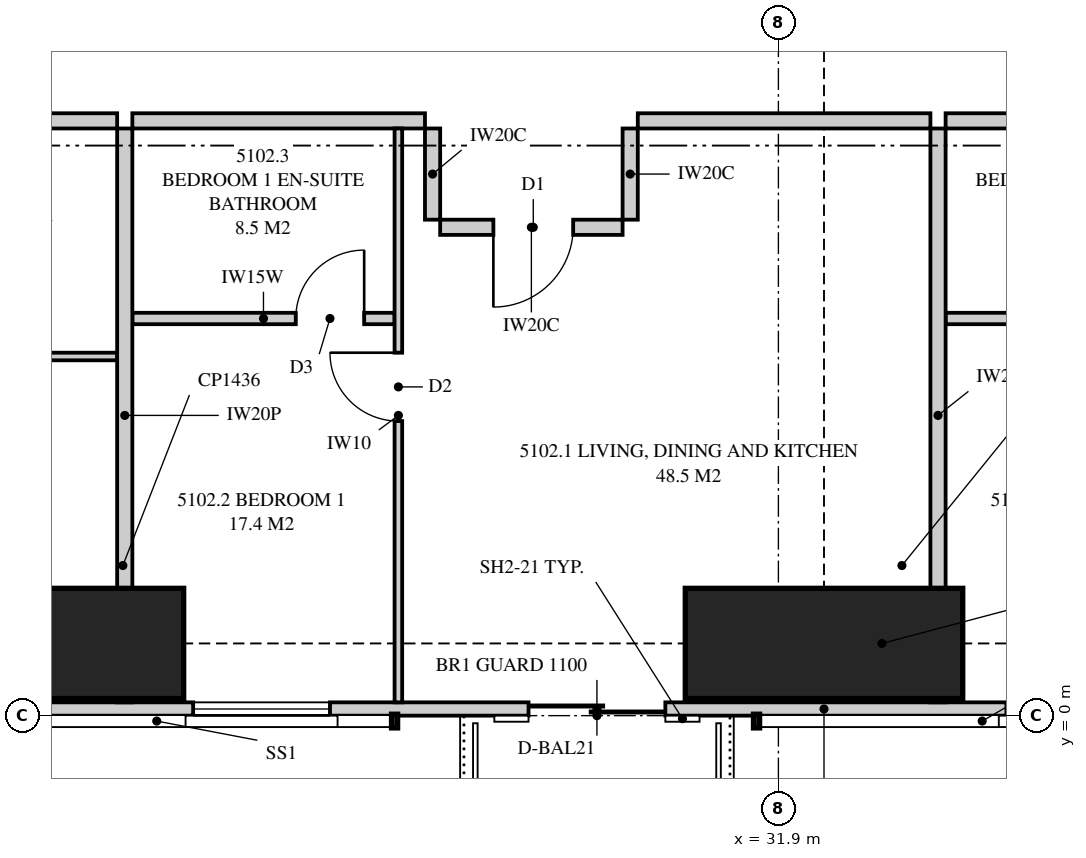
"""IFC4 building model, lengths in metres.
Left out: names, types, materials, properties, quantities, classifications, styles, units other than length and angle.
Written with IfcOpenShell. Run it as: python <this file> out.ifc"""

import sys

from ifc_helpers import new_model, si_unit, direction, frame, frame_2d, origin, origin_2d, place, context, subcontext, project, spatial, polyline, rectangle, outline, extrude, element, fill, save


model = new_model("IFC4")
c1 = context("Model", 3, precision=1e-05, world=origin(), true_north=direction((0.0, 1.0)))
c2 = subcontext(c1, "Body", "Model", "MODEL_VIEW")
j1 = project(units=[si_unit("LENGTHUNIT", "METRE"), si_unit("PLANEANGLEUNIT", "RADIAN")], contexts=[c1])
p1 = place(None, origin())
s1 = spatial("IfcSite", under=j1, at=p1, CompositionType="ELEMENT")
p2 = place(p1, origin())
s2 = spatial("IfcBuilding", under=s1, at=p2, CompositionType="ELEMENT")
p3 = place(p2, frame((0.0, 0.0, 187.85)))
s3 = spatial("IfcBuildingStorey", under=s2, at=p3, CompositionType="ELEMENT", Elevation=187.85)
for number, where, z_axis, x_axis in (
    (1, (22.25, 0.95, 0.0), (0.0, 0.0, 1.0), (0.0, 1.0, 0.0)),
    (2, (32.5, 0.95, 0.0), (0.0, 0.0, 1.0), (0.0, 1.0, 0.0)),
):
    element("IfcColumn", number, at=place(p3, frame(where, z_axis=z_axis, x_axis=x_axis)), inside=s3, PredefinedType="COLUMN", context=c2, shape_type="SweptSolid", body=[
        extrude(rectangle(XDim=1.45, YDim=3.65, at=origin_2d()), origin(), (0.0, 0.0, 1.0), 3.35),
    ])
p4 = place(p3, frame((15.051, 0.087, 0.0), z_axis=(0.0, 0.0, 1.0), x_axis=(1.0, 0.0, 0.0)))
e3 = element("IfcWall", 3, at=p4, inside=s3, PredefinedType="SOLIDWALL", context=c2, shape_type="SweptSolid", body=[
    extrude(outline(polyline([(0.0, 0.0), (34.897, 0.0), (34.897, 3.11), (27.91, 3.11), (27.91, 2.15), (27.836, 2.15), (27.836, 3.11), (27.699, 3.11), (27.699, 2.15), (7.199, 2.15), (7.199, 3.11), (7.062, 3.11), (7.062, 2.15), (6.987, 2.15), (6.987, 3.11), (0.0, 3.11), (0.0, 0.0)])), frame((0.0, 0.087, 0.0), z_axis=(0.0, -1.0, 0.0), x_axis=(1.0, 0.0, 0.0)), (0.0, 0.0, 1.0), 0.175),
])
p5 = place(p4, frame((2.84, 0.0, 0.4)))
e4 = element("IfcOpeningElement", 4, at=p5, cuts=e3, PredefinedType="OPENING", context=c2, shape_type="SweptSolid", body=[
    extrude(rectangle(XDim=2.4, YDim=1.7, at=frame_2d((1.2, 0.85))), frame((0.0, 0.097, 0.0), z_axis=(0.0, -1.0, 0.0), x_axis=(1.0, 0.0, 0.0)), (0.0, 0.0, 1.0), 0.195),
])
p6 = place(p4, frame((9.149, 0.0, 0.4)))
e5 = element("IfcOpeningElement", 5, at=p6, cuts=e3, PredefinedType="OPENING", context=c2, shape_type="SweptSolid", body=[
    extrude(rectangle(XDim=1.8, YDim=1.7, at=frame_2d((0.9, 0.85))), frame((0.0, 0.097, 0.0), z_axis=(0.0, -1.0, 0.0), x_axis=(1.0, 0.0, 0.0)), (0.0, 0.0, 1.0), 0.195),
])
p7 = place(p4, frame((13.561, 0.0, 0.0)))
e6 = element("IfcOpeningElement", 6, at=p7, cuts=e3, PredefinedType="OPENING", context=c2, shape_type="SweptSolid", body=[
    extrude(rectangle(XDim=1.8, YDim=2.1, at=frame_2d((0.9, 1.05))), frame((0.0, 0.097, 0.0), z_axis=(0.0, -1.0, 0.0), x_axis=(1.0, 0.0, 0.0)), (0.0, 0.0, 1.0), 0.195),
])
p8 = place(p4, frame((19.849, 0.0, 0.4)))
e7 = element("IfcOpeningElement", 7, at=p8, cuts=e3, PredefinedType="OPENING", context=c2, shape_type="SweptSolid", body=[
    extrude(rectangle(XDim=1.8, YDim=1.7, at=frame_2d((0.9, 0.85))), frame((0.0, 0.097, 0.0), z_axis=(0.0, -1.0, 0.0), x_axis=(1.0, 0.0, 0.0)), (0.0, 0.0, 1.0), 0.195),
])
p9 = place(p4, frame((23.449, 0.0, 0.4)))
e8 = element("IfcOpeningElement", 8, at=p9, cuts=e3, PredefinedType="OPENING", context=c2, shape_type="SweptSolid", body=[
    extrude(rectangle(XDim=1.8, YDim=1.7, at=frame_2d((0.9, 0.85))), frame((0.0, 0.097, 0.0), z_axis=(0.0, -1.0, 0.0), x_axis=(1.0, 0.0, 0.0)), (0.0, 0.0, 1.0), 0.195),
])
p10 = place(p4, frame((29.636, 0.0, 0.4)))
e9 = element("IfcOpeningElement", 9, at=p10, cuts=e3, PredefinedType="OPENING", context=c2, shape_type="SweptSolid", body=[
    extrude(rectangle(XDim=1.8, YDim=1.7, at=frame_2d((0.9, 0.85))), frame((0.0, 0.097, 0.0), z_axis=(0.0, -1.0, 0.0), x_axis=(1.0, 0.0, 0.0)), (0.0, 0.0, 1.0), 0.195),
])
p11 = place(p4, frame((32.56, 0.0, 0.4)))
e10 = element("IfcOpeningElement", 10, at=p11, cuts=e3, PredefinedType="OPENING", context=c2, shape_type="SweptSolid", body=[
    extrude(rectangle(XDim=1.8, YDim=1.7, at=frame_2d((0.9, 0.85))), frame((0.0, 0.097, 0.0), z_axis=(0.0, -1.0, 0.0), x_axis=(1.0, 0.0, 0.0)), (0.0, 0.0, 1.0), 0.195),
])
p12 = place(p3, frame((23.3, 0.175, 0.0), z_axis=(0.0, 0.0, 1.0), x_axis=(0.0, 1.0, 0.0)))
e11 = element("IfcWall", 11, at=p12, inside=s3, PredefinedType="PARTITIONING", context=c2, shape_type="SweptSolid", body=[
    extrude(outline(polyline([(0.529, 2.15), (0.0, 2.15), (0.0, 0.0), (0.529, 0.0), (0.529, 0.472), (1.021, 0.472), (1.021, 0.0), (7.55, 0.0), (7.55, 3.11), (1.685, 3.11), (1.685, 2.15), (1.021, 2.15), (1.021, 1.678), (0.529, 1.678), (0.529, 2.15)])), frame((0.0, 0.1, 0.0), z_axis=(0.0, -1.0, 0.0), x_axis=(1.0, 0.0, 0.0)), (0.0, 0.0, 1.0), 0.2),
])
p13 = place(p3, frame((17.85, 7.825, 0.0), z_axis=(0.0, 0.0, 1.0), x_axis=(1.0, 0.0, 0.0)))
e12 = element("IfcWall", 12, at=p13, inside=s3, PredefinedType="PARTITIONING", context=c2, shape_type="SweptSolid", body=[
    extrude(outline(polyline([(0.0, 0.0), (5.35, 0.0), (5.35, 3.11), (4.737, 3.11), (4.737, 2.541), (4.062, 2.541), (4.062, 3.11), (0.0, 3.11), (0.0, 0.0)])), frame((0.0, 0.1, 0.0), z_axis=(0.0, -1.0, 0.0), x_axis=(1.0, 0.0, 0.0)), (0.0, 0.0, 1.0), 0.2),
])
p14 = place(p13, frame((0.2, 0.0, 0.0)))
e13 = element("IfcOpeningElement", 13, at=p14, cuts=e12, PredefinedType="OPENING", context=c2, shape_type="SweptSolid", body=[
    extrude(rectangle(XDim=1.05, YDim=2.2, at=frame_2d((0.525, 1.1))), frame((0.0, 0.11, 0.0), z_axis=(0.0, -1.0, 0.0), x_axis=(1.0, 0.0, 0.0)), (0.0, 0.0, 1.0), 0.22),
])
p15 = place(p3, frame((19.65, 4.725, 0.0), z_axis=(0.0, 0.0, 1.0), x_axis=(1.0, 0.0, 0.0)))
e14 = element("IfcWall", 14, at=p15, inside=s3, PredefinedType="PARTITIONING", context=c2, shape_type="SweptSolid", body=[
    extrude(outline(polyline([(0.0, 0.0), (3.55, 0.0), (3.55, 3.11), (2.887, 3.11), (2.887, 2.541), (2.312, 2.541), (2.312, 3.11), (0.0, 3.11), (0.0, 0.0)])), frame((0.0, 0.05, 0.0), z_axis=(0.0, -1.0, 0.0), x_axis=(1.0, 0.0, 0.0)), (0.0, 0.0, 1.0), 0.1),
])
p16 = place(p15, frame((1.3, 0.0, 0.0)))
e15 = element("IfcOpeningElement", 15, at=p16, cuts=e14, PredefinedType="OPENING", context=c2, shape_type="SweptSolid", body=[
    extrude(rectangle(XDim=0.9, YDim=2.1, at=frame_2d((0.45, 1.05))), frame((0.0, 0.06, 0.0), z_axis=(0.0, -1.0, 0.0), x_axis=(1.0, 0.0, 0.0)), (0.0, 0.0, 1.0), 0.12),
])
p17 = place(p3, frame((34.0, 0.175, 0.0), z_axis=(0.0, 0.0, 1.0), x_axis=(0.0, 1.0, 0.0)))
e16 = element("IfcWall", 16, at=p17, inside=s3, PredefinedType="PARTITIONING", context=c2, shape_type="SweptSolid", body=[
    extrude(outline(polyline([(0.0, 0.0), (7.55, 0.0), (7.55, 3.11), (1.685, 3.11), (1.685, 2.15), (0.0, 2.15), (0.0, 3.11), (0.0, 0.0)])), frame((0.0, 0.1, 0.0), z_axis=(0.0, -1.0, 0.0), x_axis=(1.0, 0.0, 0.0)), (0.0, 0.0, 1.0), 0.2),
])
p18 = place(p3, frame((23.4, 7.825, 0.0), z_axis=(0.0, 0.0, 1.0), x_axis=(1.0, 0.0, 0.0)))
e17 = element("IfcWall", 17, at=p18, inside=s3, PredefinedType="PARTITIONING", context=c2, shape_type="SweptSolid", body=[
    extrude(rectangle(XDim=3.85, YDim=0.2, at=frame_2d((1.925, 0.0))), origin(), (0.0, 0.0, 1.0), 3.11),
])
p19 = place(p3, frame((26.9, 0.175, 0.0), z_axis=(0.0, 0.0, 1.0), x_axis=(0.0, 1.0, 0.0)))
e18 = element("IfcWall", 18, at=p19, inside=s3, PredefinedType="PARTITIONING", context=c2, shape_type="SweptSolid", body=[
    extrude(outline(polyline([(0.0, 0.0), (7.55, 0.0), (7.55, 3.11), (1.635, 3.11), (1.635, 2.15), (0.0, 2.15), (0.0, 3.11), (0.0, 0.0)])), frame((0.0, 0.05, 0.0), z_axis=(0.0, -1.0, 0.0), x_axis=(1.0, 0.0, 0.0)), (0.0, 0.0, 1.0), 0.1),
])
p20 = place(p19, frame((3.7, 0.0, 0.0)))
e19 = element("IfcOpeningElement", 19, at=p20, cuts=e18, PredefinedType="OPENING", context=c2, shape_type="SweptSolid", body=[
    extrude(rectangle(XDim=0.9, YDim=2.1, at=frame_2d((0.45, 1.05))), frame((0.0, 0.06, 0.0), z_axis=(0.0, -1.0, 0.0), x_axis=(1.0, 0.0, 0.0)), (0.0, 0.0, 1.0), 0.12),
])
p21 = place(p3, frame((23.4, 5.225, 0.0), z_axis=(0.0, 0.0, 1.0), x_axis=(1.0, 0.0, 0.0)))
e20 = element("IfcWall", 20, at=p21, inside=s3, PredefinedType="PLUMBINGWALL", context=c2, shape_type="SweptSolid", body=[
    extrude(rectangle(XDim=3.45, YDim=0.15, at=frame_2d((1.725, 0.0))), origin(), (0.0, 0.0, 1.0), 3.11),
])
p22 = place(p21, frame((2.15, 0.0, 0.0)))
e21 = element("IfcOpeningElement", 21, at=p22, cuts=e20, PredefinedType="OPENING", context=c2, shape_type="SweptSolid", body=[
    extrude(rectangle(XDim=0.9, YDim=2.1, at=frame_2d((0.45, 1.05))), frame((0.0, 0.085, 0.0), z_axis=(0.0, -1.0, 0.0), x_axis=(1.0, 0.0, 0.0)), (0.0, 0.0, 1.0), 0.17),
])
p23 = place(p3, frame((34.1, 7.825, 0.0), z_axis=(0.0, 0.0, 1.0), x_axis=(1.0, 0.0, 0.0)))
e22 = element("IfcWall", 22, at=p23, inside=s3, PredefinedType="PARTITIONING", context=c2, shape_type="SweptSolid", body=[
    extrude(outline(polyline([(0.0, 0.0), (11.85, 0.0), (11.85, 3.11), (8.987, 3.11), (8.987, 2.541), (8.312, 2.541), (8.312, 3.11), (0.0, 3.11), (0.0, 0.0)])), frame((0.0, 0.1, 0.0), z_axis=(0.0, -1.0, 0.0), x_axis=(1.0, 0.0, 0.0)), (0.0, 0.0, 1.0), 0.2),
])
p24 = place(p23, frame((8.9, 0.0, 0.0)))
e23 = element("IfcOpeningElement", 23, at=p24, cuts=e22, PredefinedType="OPENING", context=c2, shape_type="SweptSolid", body=[
    extrude(rectangle(XDim=1.05, YDim=2.2, at=frame_2d((0.525, 1.1))), frame((0.0, 0.11, 0.0), z_axis=(0.0, -1.0, 0.0), x_axis=(1.0, 0.0, 0.0)), (0.0, 0.0, 1.0), 0.22),
])
p25 = place(p3, frame((34.1, 5.225, 0.0), z_axis=(0.0, 0.0, 1.0), x_axis=(1.0, 0.0, 0.0)))
e24 = element("IfcWall", 24, at=p25, inside=s3, PredefinedType="PLUMBINGWALL", context=c2, shape_type="SweptSolid", body=[
    extrude(rectangle(XDim=3.45, YDim=0.15, at=frame_2d((1.725, 0.0))), origin(), (0.0, 0.0, 1.0), 3.11),
])
p26 = place(p25, frame((2.15, 0.0, 0.0)))
e25 = element("IfcOpeningElement", 25, at=p26, cuts=e24, PredefinedType="OPENING", context=c2, shape_type="SweptSolid", body=[
    extrude(rectangle(XDim=0.9, YDim=2.1, at=frame_2d((0.45, 1.05))), frame((0.0, 0.085, 0.0), z_axis=(0.0, -1.0, 0.0), x_axis=(1.0, 0.0, 0.0)), (0.0, 0.0, 1.0), 0.17),
])
p27 = place(p3, frame((30.05, 7.825, 0.0), z_axis=(0.0, 0.0, 1.0), x_axis=(1.0, 0.0, 0.0)))
e26 = element("IfcWall", 26, at=p27, inside=s3, PredefinedType="PARTITIONING", context=c2, shape_type="SweptSolid", body=[
    extrude(outline(polyline([(0.0, 0.0), (3.85, 0.0), (3.85, 3.11), (2.787, 3.11), (2.787, 2.541), (2.113, 2.541), (2.113, 3.11), (0.0, 3.11), (0.0, 0.0)])), frame((0.0, 0.1, 0.0), z_axis=(0.0, -1.0, 0.0), x_axis=(1.0, 0.0, 0.0)), (0.0, 0.0, 1.0), 0.2),
])
p28 = place(p3, frame((27.45, 6.425, 0.0), z_axis=(0.0, 0.0, 1.0), x_axis=(1.0, 0.0, 0.0)))
e27 = element("IfcWall", 27, at=p28, inside=s3, PredefinedType="PARTITIONING", context=c2, shape_type="SweptSolid", body=[
    extrude(rectangle(XDim=2.4, YDim=0.2, at=frame_2d((1.2, 0.0))), origin(), (0.0, 0.0, 1.0), 3.11),
])
p29 = place(p28, frame((0.7, 0.0, 0.0)))
e28 = element("IfcOpeningElement", 28, at=p29, cuts=e27, PredefinedType="OPENING", context=c2, shape_type="SweptSolid", body=[
    extrude(rectangle(XDim=1.05, YDim=2.2, at=frame_2d((0.525, 1.1))), frame((0.0, 0.11, 0.0), z_axis=(0.0, -1.0, 0.0), x_axis=(1.0, 0.0, 0.0)), (0.0, 0.0, 1.0), 0.22),
])
for number, where, z_axis, x_axis in (
    (29, (27.35, 7.725, 0.0), (0.0, 0.0, 1.0), (0.0, -1.0, 0.0)),
    (30, (29.95, 7.725, 0.0), (0.0, 0.0, 1.0), (0.0, -1.0, 0.0)),
):
    element("IfcWall", number, at=place(p3, frame(where, z_axis=z_axis, x_axis=x_axis)), inside=s3, PredefinedType="PARTITIONING", context=c2, shape_type="SweptSolid", body=[
        extrude(rectangle(XDim=1.2, YDim=0.2, at=frame_2d((0.6, 0.0))), origin(), (0.0, 0.0, 1.0), 3.11),
    ])
p30 = place(p6, origin())
e31 = element("IfcWindow", 31, at=p30, inside=s3, PartitioningType="SINGLE_PANEL", PredefinedType="WINDOW", context=c2, shape_type="SweptSolid", body=[
    extrude(rectangle(XDim=1.8, YDim=1.7, at=frame_2d((0.9, 0.85))), frame((0.0, 0.03, 0.0), z_axis=(0.0, -1.0, 0.0), x_axis=(1.0, 0.0, 0.0)), (0.0, 0.0, 1.0), 0.06),
])
fill(e5, e31)
p31 = place(p7, origin())
e32 = element("IfcDoor", 32, at=p31, inside=s3, OperationType="SLIDING_TO_LEFT", PredefinedType="DOOR", context=c2, shape_type="SweptSolid", body=[
    extrude(rectangle(XDim=1.8, YDim=2.1, at=frame_2d((0.9, 1.05))), frame((0.0, 0.025, 0.0), z_axis=(0.0, -1.0, 0.0), x_axis=(1.0, 0.0, 0.0)), (0.0, 0.0, 1.0), 0.05),
])
fill(e6, e32)
p32 = place(p8, origin())
e33 = element("IfcWindow", 33, at=p32, inside=s3, PartitioningType="SINGLE_PANEL", PredefinedType="WINDOW", context=c2, shape_type="SweptSolid", body=[
    extrude(rectangle(XDim=1.8, YDim=1.7, at=frame_2d((0.9, 0.85))), frame((0.0, 0.03, 0.0), z_axis=(0.0, -1.0, 0.0), x_axis=(1.0, 0.0, 0.0)), (0.0, 0.0, 1.0), 0.06),
])
fill(e7, e33)
p33 = place(p29, frame((1.05, 0.0, 0.0), z_axis=(0.0, 0.0, 1.0), x_axis=(-1.0, 0.0, 0.0)))
e34 = element("IfcDoor", 34, at=p33, inside=s3, OperationType="SINGLE_SWING_RIGHT", PredefinedType="DOOR", context=c2, shape_type="SweptSolid", body=[
    extrude(rectangle(XDim=1.05, YDim=2.2, at=frame_2d((0.525, 1.1))), frame((0.0, 0.025, 0.0), z_axis=(0.0, -1.0, 0.0), x_axis=(1.0, 0.0, 0.0)), (0.0, 0.0, 1.0), 0.05),
])
fill(e28, e34)
p34 = place(p20, origin())
e35 = element("IfcDoor", 35, at=p34, inside=s3, OperationType="SINGLE_SWING_RIGHT", PredefinedType="DOOR", context=c2, shape_type="SweptSolid", body=[
    extrude(rectangle(XDim=0.9, YDim=2.1, at=frame_2d((0.45, 1.05))), frame((0.0, 0.025, 0.0), z_axis=(0.0, -1.0, 0.0), x_axis=(1.0, 0.0, 0.0)), (0.0, 0.0, 1.0), 0.05),
])
fill(e19, e35)
p35 = place(p22, origin())
e36 = element("IfcDoor", 36, at=p35, inside=s3, OperationType="SINGLE_SWING_RIGHT", PredefinedType="DOOR", context=c2, shape_type="SweptSolid", body=[
    extrude(rectangle(XDim=0.9, YDim=2.1, at=frame_2d((0.45, 1.05))), frame((0.0, 0.025, 0.0), z_axis=(0.0, -1.0, 0.0), x_axis=(1.0, 0.0, 0.0)), (0.0, 0.0, 1.0), 0.05),
])
fill(e21, e36)
save(model, sys.argv[1])
